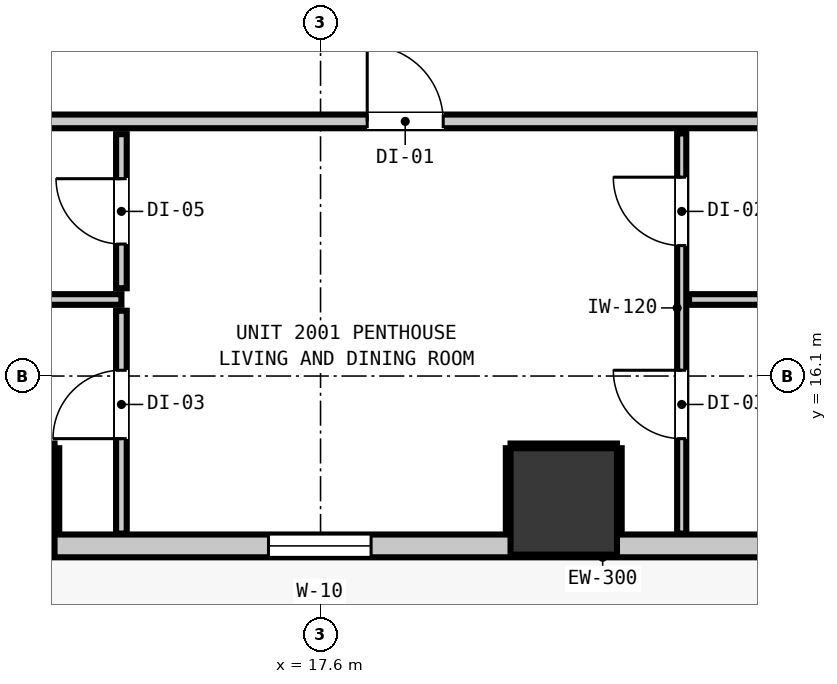
"""IFC4 building model, lengths in metres.
Left out: names, types, materials, properties, quantities, classifications, styles, units other than length and angle.
Written with IfcOpenShell. Run it as: python <this file> out.ifc"""

import sys

from ifc_helpers import new_model, si_unit, direction, frame, frame_2d, origin, origin_2d, place, context, subcontext, project, spatial, rectangle, extrude, element, fill, save


model = new_model("IFC4")
c1 = context("Model", 3, precision=1e-05, world=origin(), true_north=direction((0.0, 1.0)))
c2 = subcontext(c1, "Body", "Model", "MODEL_VIEW")
j1 = project(units=[si_unit("LENGTHUNIT", "METRE"), si_unit("PLANEANGLEUNIT", "RADIAN")], contexts=[c1])
p1 = place(None, origin())
s1 = spatial("IfcSite", under=j1, at=p1, CompositionType="ELEMENT")
p2 = place(p1, origin())
s2 = spatial("IfcBuilding", under=s1, at=p2, CompositionType="ELEMENT")
p3 = place(p2, frame((0.0, 0.0, 71.8)))
s3 = spatial("IfcBuildingStorey", under=s2, at=p3, CompositionType="ELEMENT", Elevation=71.8)
for number, where, z_axis, x_axis in (
    (1, (13.4, 14.45, 0.0), (0.0, 0.0, 1.0), (1.0, 0.0, 0.0)),
    (2, (20.8, 14.45, 0.0), (0.0, 0.0, 1.0), (1.0, 0.0, 0.0)),
):
    element("IfcColumn", number, at=place(p3, frame(where, z_axis=z_axis, x_axis=x_axis)), inside=s3, PredefinedType="COLUMN", context=c2, shape_type="SweptSolid", body=[
        extrude(rectangle(XDim=1.4, YDim=1.4, at=origin_2d()), origin(), (0.0, 0.0, 1.0), 3.32),
    ])
p4 = place(p3, frame((47.835, 13.865, 0.0), z_axis=(0.0, 0.0, 1.0), x_axis=(-1.0, 0.0, 0.0)))
e3 = element("IfcWall", 3, at=p4, inside=s3, PredefinedType="STANDARD", context=c2, shape_type="SweptSolid", body=[
    extrude(rectangle(XDim=37.47, YDim=0.3, at=frame_2d((18.735, 0.0))), origin(), (0.0, 0.0, 1.0), 3.06),
])
p5 = place(p4, frame((0.901, 0.0, 0.0)))
e4 = element("IfcOpeningElement", 4, at=p5, cuts=e3, PredefinedType="OPENING", context=c2, shape_type="SweptSolid", body=[
    extrude(rectangle(XDim=1.0, YDim=2.15, at=frame_2d((0.5, 1.075))), frame((0.0, 0.16, 0.0), z_axis=(0.0, -1.0, 0.0), x_axis=(1.0, 0.0, 0.0)), (0.0, 0.0, 1.0), 0.32),
])
p6 = place(p4, frame((29.57, 0.0, 0.85)))
e5 = element("IfcOpeningElement", 5, at=p6, cuts=e3, PredefinedType="OPENING", context=c2, shape_type="SweptSolid", body=[
    extrude(rectangle(XDim=1.35, YDim=1.85, at=frame_2d((0.675, 0.925))), frame((0.0, 0.16, 0.0), z_axis=(0.0, -1.0, 0.0), x_axis=(1.0, 0.0, 0.0)), (0.0, 0.0, 1.0), 0.32),
])
p7 = place(p4, frame((35.583, 0.0, 0.85)))
e6 = element("IfcOpeningElement", 6, at=p7, cuts=e3, PredefinedType="OPENING", context=c2, shape_type="SweptSolid", body=[
    extrude(rectangle(XDim=1.35, YDim=1.85, at=frame_2d((0.675, 0.925))), frame((0.0, 0.16, 0.0), z_axis=(0.0, -1.0, 0.0), x_axis=(1.0, 0.0, 0.0)), (0.0, 0.0, 1.0), 0.32),
])
p8 = place(p4, frame((22.126, 0.0, 0.85)))
e7 = element("IfcOpeningElement", 7, at=p8, cuts=e3, PredefinedType="OPENING", context=c2, shape_type="SweptSolid", body=[
    extrude(rectangle(XDim=1.35, YDim=1.85, at=frame_2d((0.675, 0.925))), frame((0.0, 0.16, 0.0), z_axis=(0.0, -1.0, 0.0), x_axis=(1.0, 0.0, 0.0)), (0.0, 0.0, 1.0), 0.32),
])
p9 = place(p4, frame((15.814, 0.0, 0.85)))
e8 = element("IfcOpeningElement", 8, at=p9, cuts=e3, PredefinedType="OPENING", context=c2, shape_type="SweptSolid", body=[
    extrude(rectangle(XDim=1.35, YDim=1.85, at=frame_2d((0.675, 0.925))), frame((0.0, 0.16, 0.0), z_axis=(0.0, -1.0, 0.0), x_axis=(1.0, 0.0, 0.0)), (0.0, 0.0, 1.0), 0.32),
])
p10 = place(p4, frame((5.7, 0.0, 0.85)))
e9 = element("IfcOpeningElement", 9, at=p10, cuts=e3, PredefinedType="OPENING", context=c2, shape_type="SweptSolid", body=[
    extrude(rectangle(XDim=1.35, YDim=1.85, at=frame_2d((0.675, 0.925))), frame((0.0, 0.16, 0.0), z_axis=(0.0, -1.0, 0.0), x_axis=(1.0, 0.0, 0.0)), (0.0, 0.0, 1.0), 0.32),
])
p11 = place(p4, frame((12.764, 0.0, 0.85)))
e10 = element("IfcOpeningElement", 10, at=p11, cuts=e3, PredefinedType="OPENING", context=c2, shape_type="SweptSolid", body=[
    extrude(rectangle(XDim=1.35, YDim=1.85, at=frame_2d((0.675, 0.925))), frame((0.0, 0.16, 0.0), z_axis=(0.0, -1.0, 0.0), x_axis=(1.0, 0.0, 0.0)), (0.0, 0.0, 1.0), 0.32),
])
p12 = place(p3, frame((8.027, 19.45, 0.0), z_axis=(0.0, 0.0, 1.0), x_axis=(1.0, 0.0, 0.0)))
e11 = element("IfcWall", 11, at=p12, inside=s3, PredefinedType="PARTITIONING", context=c2, shape_type="SweptSolid", body=[
    extrude(rectangle(XDim=28.902, YDim=0.18, at=frame_2d((14.451, 0.0))), origin(), (0.0, 0.0, 1.0), 3.06),
])
p13 = place(p12, frame((10.187, 0.0, 0.0)))
e12 = element("IfcOpeningElement", 12, at=p13, cuts=e11, PredefinedType="OPENING", context=c2, shape_type="SweptSolid", body=[
    extrude(rectangle(XDim=1.0, YDim=2.15, at=frame_2d((0.5, 1.075))), frame((0.0, 0.1, 0.0), z_axis=(0.0, -1.0, 0.0), x_axis=(1.0, 0.0, 0.0)), (0.0, 0.0, 1.0), 0.2),
])
p14 = place(p3, frame((8.027, 17.107, 0.0), z_axis=(0.0, 0.0, 1.0), x_axis=(1.0, 0.0, 0.0)))
e13 = element("IfcWall", 13, at=p14, inside=s3, PredefinedType="PARTITIONING", context=c2, shape_type="SweptSolid", body=[
    extrude(rectangle(XDim=6.953, YDim=0.14, at=frame_2d((3.477, 0.0))), origin(), (0.0, 0.0, 1.0), 3.06),
])
p15 = place(p3, frame((22.448, 17.107, 0.0), z_axis=(0.0, 0.0, 1.0), x_axis=(1.0, 0.0, 0.0)))
e14 = element("IfcWall", 14, at=p15, inside=s3, PredefinedType="PARTITIONING", context=c2, shape_type="SweptSolid", body=[
    extrude(rectangle(XDim=15.636, YDim=0.14, at=frame_2d((7.818, 0.0))), origin(), (0.0, 0.0, 1.0), 3.06),
])
p16 = place(p3, frame((14.98, 14.027, 0.0), z_axis=(0.0, 0.0, 1.0), x_axis=(0.0, 1.0, 0.0)))
e15 = element("IfcWall", 15, at=p16, inside=s3, PredefinedType="PARTITIONING", context=c2, shape_type="SweptSolid", body=[
    extrude(rectangle(XDim=2.932, YDim=0.14, at=frame_2d((1.466, 0.0))), origin(), (0.0, 0.0, 1.0), 3.06),
])
p17 = place(p16, frame((1.249, 0.0, 0.0)))
e16 = element("IfcOpeningElement", 16, at=p17, cuts=e15, PredefinedType="OPENING", context=c2, shape_type="SweptSolid", body=[
    extrude(rectangle(XDim=0.9, YDim=2.1, at=frame_2d((0.45, 1.05))), frame((0.0, 0.08, 0.0), z_axis=(0.0, -1.0, 0.0), x_axis=(1.0, 0.0, 0.0)), (0.0, 0.0, 1.0), 0.16),
])
p18 = place(p3, frame((14.98, 17.255, 0.0), z_axis=(0.0, 0.0, 1.0), x_axis=(0.0, 1.0, 0.0)))
e17 = element("IfcWall", 17, at=p18, inside=s3, PredefinedType="PARTITIONING", context=c2, shape_type="SweptSolid", body=[
    extrude(rectangle(XDim=2.027, YDim=0.14, at=frame_2d((1.014, 0.0))), origin(), (0.0, 0.0, 1.0), 3.06),
])
p19 = place(p18, frame((0.581, 0.0, 0.0)))
e18 = element("IfcOpeningElement", 18, at=p19, cuts=e17, PredefinedType="OPENING", context=c2, shape_type="SweptSolid", body=[
    extrude(rectangle(XDim=0.86, YDim=2.02, at=frame_2d((0.43, 1.01))), frame((0.0, 0.08, 0.0), z_axis=(0.0, -1.0, 0.0), x_axis=(1.0, 0.0, 0.0)), (0.0, 0.0, 1.0), 0.16),
])
p20 = place(p3, frame((22.352, 14.027, 0.0), z_axis=(0.0, 0.0, 1.0), x_axis=(0.0, 1.0, 0.0)))
e19 = element("IfcWall", 19, at=p20, inside=s3, PredefinedType="PARTITIONING", context=c2, shape_type="SweptSolid", body=[
    extrude(rectangle(XDim=5.265, YDim=0.12, at=frame_2d((2.632, 0.0))), origin(), (0.0, 0.0, 1.0), 3.06),
])
p21 = place(p20, frame((3.789, 0.0, 0.0)))
e20 = element("IfcOpeningElement", 20, at=p21, cuts=e19, PredefinedType="OPENING", context=c2, shape_type="SweptSolid", body=[
    extrude(rectangle(XDim=0.9, YDim=2.1, at=frame_2d((0.45, 1.05))), frame((0.0, 0.07, 0.0), z_axis=(0.0, -1.0, 0.0), x_axis=(1.0, 0.0, 0.0)), (0.0, 0.0, 1.0), 0.14),
])
p22 = place(p20, frame((1.249, 0.0, 0.0)))
e21 = element("IfcOpeningElement", 21, at=p22, cuts=e19, PredefinedType="OPENING", context=c2, shape_type="SweptSolid", body=[
    extrude(rectangle(XDim=0.9, YDim=2.1, at=frame_2d((0.45, 1.05))), frame((0.0, 0.07, 0.0), z_axis=(0.0, -1.0, 0.0), x_axis=(1.0, 0.0, 0.0)), (0.0, 0.0, 1.0), 0.14),
])
p23 = place(p3, frame((12.7, 15.182, 0.0), z_axis=(0.0, 0.0, 1.0), x_axis=(1.0, 0.0, 0.0)))
e22 = element("IfcWall", 22, at=p23, inside=s3, PredefinedType="PARTITIONING", context=c2, shape_type="SweptSolid", body=[
    extrude(rectangle(XDim=1.4, YDim=0.06, at=frame_2d((0.7, 0.0))), origin(), (0.0, 0.0, 1.0), 1.45),
])
p24 = place(p3, frame((14.132, 14.03, 0.0), z_axis=(0.0, 0.0, 1.0), x_axis=(0.0, 1.0, 0.0)))
e23 = element("IfcWall", 23, at=p24, inside=s3, PredefinedType="PARTITIONING", context=c2, shape_type="SweptSolid", body=[
    extrude(rectangle(XDim=1.12, YDim=0.06, at=frame_2d((0.56, 0.0))), origin(), (0.0, 0.0, 1.0), 1.45),
])
p25 = place(p3, frame((20.1, 15.182, 0.0), z_axis=(0.0, 0.0, 1.0), x_axis=(1.0, 0.0, 0.0)))
e24 = element("IfcWall", 24, at=p25, inside=s3, PredefinedType="PARTITIONING", context=c2, shape_type="SweptSolid", body=[
    extrude(rectangle(XDim=1.4, YDim=0.06, at=frame_2d((0.7, 0.0))), origin(), (0.0, 0.0, 1.0), 1.45),
])
for number, where, z_axis, x_axis in (
    (25, (20.068, 14.03, 0.0), (0.0, 0.0, 1.0), (0.0, 1.0, 0.0)),
    (26, (21.532, 14.03, 0.0), (0.0, 0.0, 1.0), (0.0, 1.0, 0.0)),
):
    element("IfcWall", number, at=place(p3, frame(where, z_axis=z_axis, x_axis=x_axis)), inside=s3, PredefinedType="PARTITIONING", context=c2, shape_type="SweptSolid", body=[
        extrude(rectangle(XDim=1.12, YDim=0.06, at=frame_2d((0.56, 0.0))), origin(), (0.0, 0.0, 1.0), 1.45),
    ])
p26 = place(p6, origin())
e27 = element("IfcWindow", 27, at=p26, inside=s3, PartitioningType="SINGLE_PANEL", PredefinedType="WINDOW", context=c2, shape_type="SweptSolid", body=[
    extrude(rectangle(XDim=1.35, YDim=1.85, at=frame_2d((0.675, 0.925))), frame((0.0, 0.03, 0.0), z_axis=(0.0, -1.0, 0.0), x_axis=(1.0, 0.0, 0.0)), (0.0, 0.0, 1.0), 0.06),
])
fill(e5, e27)
p27 = place(p13, origin())
e28 = element("IfcDoor", 28, at=p27, inside=s3, OperationType="SINGLE_SWING_LEFT", PredefinedType="DOOR", context=c2, shape_type="SweptSolid", body=[
    extrude(rectangle(XDim=1.0, YDim=2.15, at=frame_2d((0.5, 1.075))), frame((0.0, 0.025, 0.0), z_axis=(0.0, -1.0, 0.0), x_axis=(1.0, 0.0, 0.0)), (0.0, 0.0, 1.0), 0.05),
])
fill(e12, e28)
p28 = place(p19, origin())
e29 = element("IfcDoor", 29, at=p28, inside=s3, OperationType="SINGLE_SWING_RIGHT", PredefinedType="DOOR", context=c2, shape_type="SweptSolid", body=[
    extrude(rectangle(XDim=0.86, YDim=2.02, at=frame_2d((0.43, 1.01))), frame((0.0, 0.025, 0.0), z_axis=(0.0, -1.0, 0.0), x_axis=(1.0, 0.0, 0.0)), (0.0, 0.0, 1.0), 0.05),
])
fill(e18, e29)
p29 = place(p17, origin())
e30 = element("IfcDoor", 30, at=p29, inside=s3, OperationType="SINGLE_SWING_LEFT", PredefinedType="DOOR", context=c2, shape_type="SweptSolid", body=[
    extrude(rectangle(XDim=0.9, YDim=2.1, at=frame_2d((0.45, 1.05))), frame((0.0, 0.025, 0.0), z_axis=(0.0, -1.0, 0.0), x_axis=(1.0, 0.0, 0.0)), (0.0, 0.0, 1.0), 0.05),
])
fill(e16, e30)
p30 = place(p21, origin())
e31 = element("IfcDoor", 31, at=p30, inside=s3, OperationType="SINGLE_SWING_RIGHT", PredefinedType="DOOR", context=c2, shape_type="SweptSolid", body=[
    extrude(rectangle(XDim=0.9, YDim=2.1, at=frame_2d((0.45, 1.05))), frame((0.0, 0.025, 0.0), z_axis=(0.0, -1.0, 0.0), x_axis=(1.0, 0.0, 0.0)), (0.0, 0.0, 1.0), 0.05),
])
fill(e20, e31)
p31 = place(p22, origin())
e32 = element("IfcDoor", 32, at=p31, inside=s3, OperationType="SINGLE_SWING_RIGHT", PredefinedType="DOOR", context=c2, shape_type="SweptSolid", body=[
    extrude(rectangle(XDim=0.9, YDim=2.1, at=frame_2d((0.45, 1.05))), frame((0.0, 0.025, 0.0), z_axis=(0.0, -1.0, 0.0), x_axis=(1.0, 0.0, 0.0)), (0.0, 0.0, 1.0), 0.05),
])
fill(e21, e32)
save(model, sys.argv[1])
